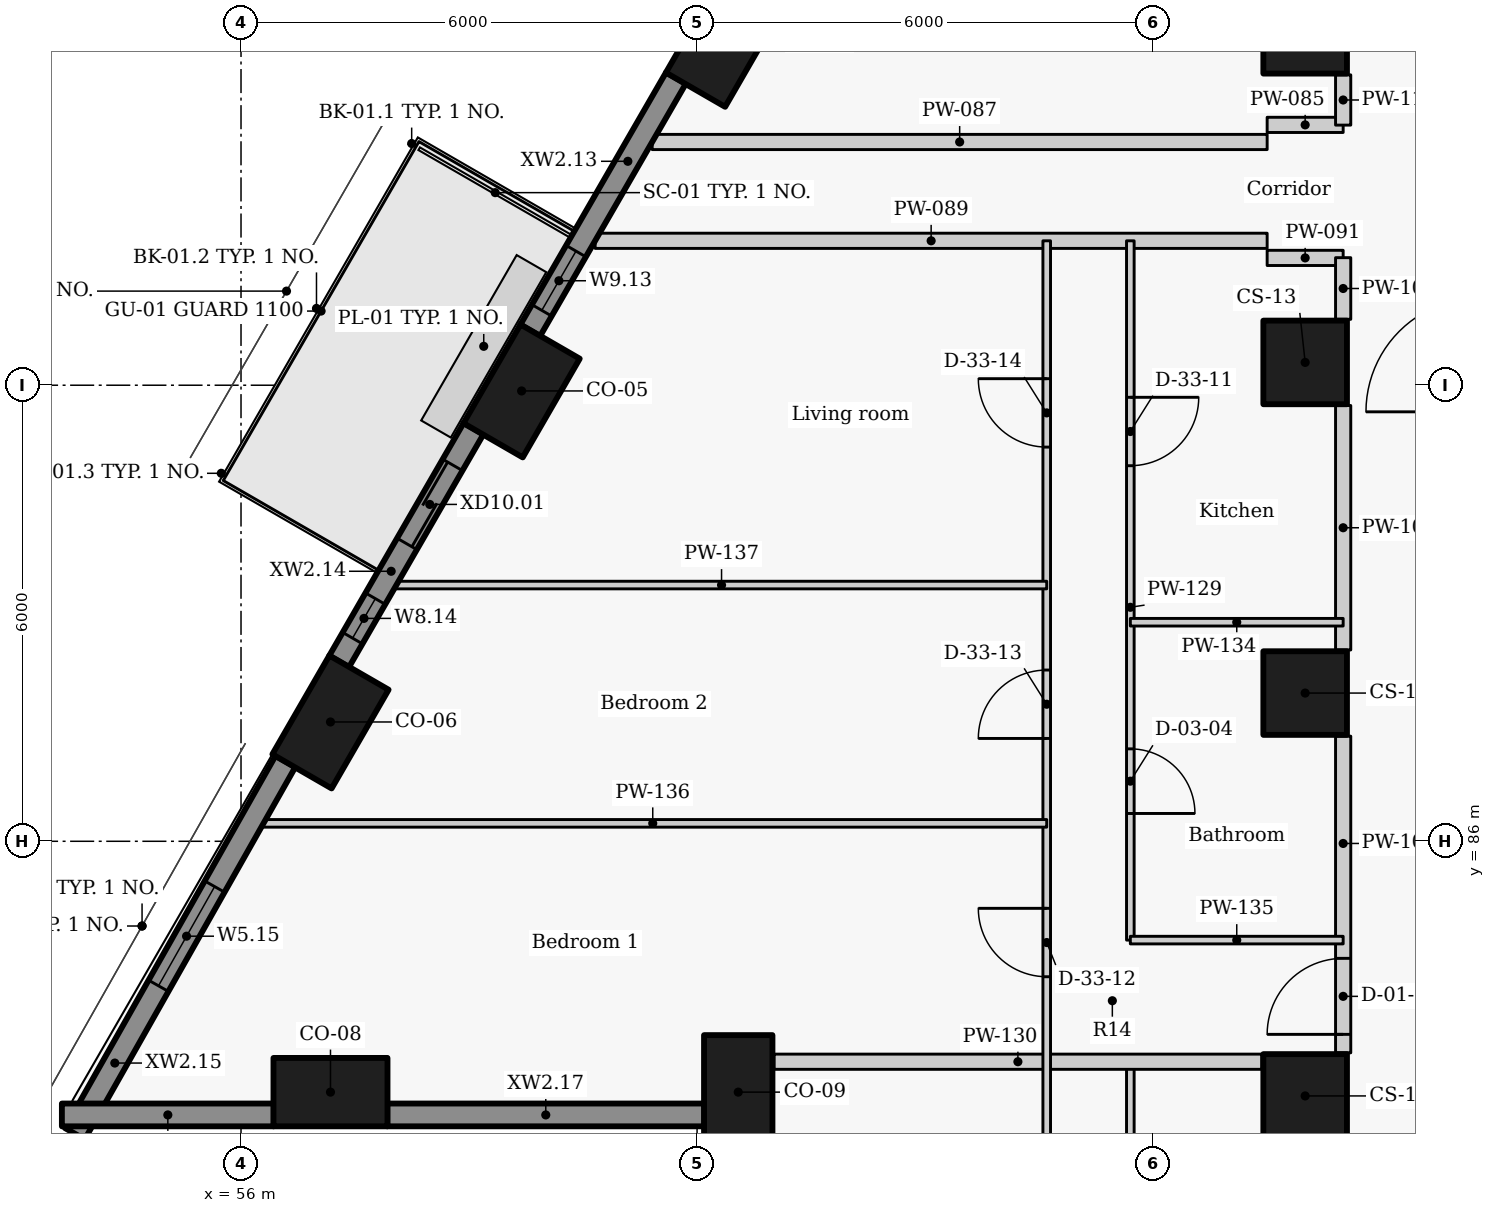
"""IFC4 building model, lengths in metres.
Left out: names, types, materials, properties, quantities, classifications, styles, units other than length and angle.
Written with IfcOpenShell. Run it as: python <this file> out.ifc"""

import sys

from ifc_helpers import new_model, si_unit, direction, frame, frame_2d, origin, origin_2d, place, context, subcontext, project, spatial, rectangle, extrude, element, fill, save


model = new_model("IFC4")
c1 = context("Model", 3, precision=1e-05, world=origin(), true_north=direction((0.0, 1.0)))
c2 = subcontext(c1, "Body", "Model", "MODEL_VIEW")
j1 = project(units=[si_unit("LENGTHUNIT", "METRE"), si_unit("PLANEANGLEUNIT", "RADIAN")], contexts=[c1])
p1 = place(None, origin())
s1 = spatial("IfcSite", under=j1, at=p1, CompositionType="ELEMENT")
p2 = place(p1, origin())
s2 = spatial("IfcBuilding", under=s1, at=p2, CompositionType="ELEMENT")
p3 = place(p2, frame((0.0, 0.0, 41.4)))
s3 = spatial("IfcBuildingStorey", under=s2, at=p3, CompositionType="ELEMENT", Elevation=41.4)
for number, where, z_axis, x_axis in (
    (1, (62.354, 96.537, 0.0), (0.0, 0.0, 1.0), (-0.5, -0.866, 0.0)),
    (2, (59.692, 91.925, 0.0), (0.0, 0.0, 1.0), (-0.5, -0.866, 0.0)),
):
    element("IfcColumn", number, at=place(p3, frame(where, z_axis=z_axis, x_axis=x_axis)), inside=s3, PredefinedType="COLUMN", context=c2, shape_type="SweptSolid", body=[
        extrude(rectangle(XDim=1.5, YDim=0.9, at=origin_2d()), origin(), (0.0, 0.0, 1.0), 3.3),
    ])
for number, where, z_axis, x_axis in (
    (3, (57.177, 87.57, -0.275), (0.0, 0.0, 1.0), (-0.5, -0.866, 0.0)),
    (4, (57.177, 82.7, -0.275), (0.0, 0.0, 1.0), (1.0, 0.0, 0.0)),
    (5, (62.542, 82.7, -0.275), (0.0, 0.0, 1.0), (0.0, -1.0, 0.0)),
):
    element("IfcColumn", number, at=place(p3, frame(where, z_axis=z_axis, x_axis=x_axis)), inside=s3, PredefinedType="COLUMN", context=c2, shape_type="SweptSolid", body=[
        extrude(rectangle(XDim=1.5, YDim=0.9, at=origin_2d()), origin(), (0.0, 0.0, 1.0), 3.575),
    ])
for number, where, z_axis, x_axis in (
    (6, (70.0, 96.65, 0.0), (0.0, 0.0, 1.0), (0.0, -1.0, 0.0)),
    (7, (70.0, 92.3, 0.0), (0.0, 0.0, 1.0), (0.0, -1.0, 0.0)),
    (8, (70.0, 87.95, 0.0), (0.0, 0.0, 1.0), (0.0, -1.0, 0.0)),
):
    element("IfcColumn", number, at=place(p3, frame(where, z_axis=z_axis, x_axis=x_axis)), inside=s3, PredefinedType="COLUMN", context=c2, shape_type="SweptSolid", body=[
        extrude(rectangle(XDim=1.1, YDim=1.1, at=origin_2d()), origin(), (0.0, 0.0, 1.0), 3.3),
    ])
p4 = place(p3, frame((70.0, 82.65, -0.275), z_axis=(0.0, 0.0, 1.0), x_axis=(0.0, -1.0, 0.0)))
e9 = element("IfcColumn", 9, at=p4, inside=s3, PredefinedType="COLUMN", context=c2, shape_type="SweptSolid", body=[
    extrude(rectangle(XDim=1.1, YDim=1.1, at=origin_2d()), origin(), (0.0, 0.0, 1.0), 3.575),
])
p5 = place(p3, frame((61.722, 96.041, 0.0), z_axis=(0.0, 0.0, 1.0), x_axis=(-0.500001735503, -0.866024401789, 0.0)))
e10 = element("IfcWall", 10, at=p5, inside=s3, PredefinedType="SOLIDWALL", context=c2, shape_type="SweptSolid", body=[
    extrude(rectangle(XDim=3.834, YDim=0.3, at=frame_2d((1.917, 0.0))), origin(), (0.0, 0.0, 1.0), 2.425),
])
p6 = place(p5, frame((2.629, 0.0, 0.9)))
e11 = element("IfcOpeningElement", 11, at=p6, cuts=e10, PredefinedType="OPENING", context=c2, shape_type="SweptSolid", body=[
    extrude(rectangle(XDim=0.9, YDim=1.1, at=frame_2d((0.45, 0.55))), frame((0.0, 0.16, 0.0), z_axis=(0.0, -1.0, 0.0), x_axis=(1.0, 0.0, 0.0)), (0.0, 0.0, 1.0), 0.32),
])
p7 = place(p3, frame((59.059, 91.429, 0.0), z_axis=(0.0, 0.0, 1.0), x_axis=(-0.499977402622, -0.866038449993, 0.0)))
e12 = element("IfcWall", 12, at=p7, inside=s3, PredefinedType="SOLIDWALL", context=c2, shape_type="SweptSolid", body=[
    extrude(rectangle(XDim=3.537, YDim=0.3, at=frame_2d((1.769, 0.0))), origin(), (0.0, 0.0, 1.0), 2.425),
])
p8 = place(p7, frame((0.551, 0.0, 0.0)))
e13 = element("IfcOpeningElement", 13, at=p8, cuts=e12, PredefinedType="OPENING", context=c2, shape_type="SweptSolid", body=[
    extrude(rectangle(XDim=1.2, YDim=2.0, at=frame_2d((0.6, 1.0))), frame((0.0, 0.16, 0.0), z_axis=(0.0, -1.0, 0.0), x_axis=(1.0, 0.0, 0.0)), (0.0, 0.0, 1.0), 0.32),
])
p9 = place(p7, frame((2.582, 0.0, 0.9)))
e14 = element("IfcOpeningElement", 14, at=p9, cuts=e12, PredefinedType="OPENING", context=c2, shape_type="SweptSolid", body=[
    extrude(rectangle(XDim=0.6, YDim=1.1, at=frame_2d((0.3, 0.55))), frame((0.0, 0.16, 0.0), z_axis=(0.0, -1.0, 0.0), x_axis=(1.0, 0.0, 0.0)), (0.0, 0.0, 1.0), 0.32),
])
p10 = place(p3, frame((56.584, 87.051, 0.0), z_axis=(0.0, 0.0, 1.0), x_axis=(-0.492363204642, -0.870389840655, 0.0)))
e15 = element("IfcWall", 15, at=p10, inside=s3, PredefinedType="SOLIDWALL", context=c2, shape_type="SweptSolid", body=[
    extrude(rectangle(XDim=5.626, YDim=0.3, at=frame_2d((2.813, 0.0))), origin(), (0.0, 0.0, 1.0), 2.425),
])
p11 = place(p10, frame((1.892, 0.0, 0.9)))
e16 = element("IfcOpeningElement", 16, at=p11, cuts=e15, PredefinedType="OPENING", context=c2, shape_type="SweptSolid", body=[
    extrude(rectangle(XDim=1.5, YDim=1.1, at=frame_2d((0.75, 0.55))), frame((0.0, 0.16, 0.0), z_axis=(0.0, -1.0, 0.0), x_axis=(1.0, 0.0, 0.0)), (0.0, 0.0, 1.0), 0.32),
])
p12 = place(p3, frame((53.643, 82.4, 0.0), z_axis=(0.0, 0.0, 1.0), x_axis=(1.0, 0.0, 0.0)))
e17 = element("IfcWall", 17, at=p12, inside=s3, PredefinedType="SOLIDWALL", context=c2, shape_type="SweptSolid", body=[
    extrude(rectangle(XDim=2.788, YDim=0.3, at=frame_2d((1.394, 0.0))), origin(), (0.0, 0.0, 1.0), 2.425),
])
p13 = place(p3, frame((57.923, 82.4, 0.0), z_axis=(0.0, 0.0, 1.0), x_axis=(1.0, 0.0, 0.0)))
e18 = element("IfcWall", 18, at=p13, inside=s3, PredefinedType="SOLIDWALL", context=c2, shape_type="SweptSolid", body=[
    extrude(rectangle(XDim=4.173, YDim=0.3, at=frame_2d((2.086, 0.0))), origin(), (0.0, 0.0, 1.0), 2.425),
])
p14 = place(p3, frame((69.5, 95.425, 0.0), z_axis=(0.0, 0.0, 1.0), x_axis=(1.0, 0.0, 0.0)))
e19 = element("IfcWall", 19, at=p14, inside=s3, PredefinedType="PARTITIONING", context=c2, shape_type="SweptSolid", body=[
    extrude(rectangle(XDim=1.0, YDim=0.2, at=frame_2d((0.5, 0.0))), origin(), (0.0, 0.0, 1.0), 2.505),
])
p15 = place(p3, frame((61.409, 95.2, 0.0), z_axis=(0.0, 0.0, 1.0), x_axis=(1.0, 0.0, 0.0)))
e20 = element("IfcWall", 20, at=p15, inside=s3, PredefinedType="PARTITIONING", context=c2, shape_type="SweptSolid", body=[
    extrude(rectangle(XDim=8.091, YDim=0.2, at=frame_2d((4.045, 0.0))), origin(), (0.0, 0.0, 1.0), 2.405),
])
p16 = place(p3, frame((60.659, 93.9, 0.0), z_axis=(0.0, 0.0, 1.0), x_axis=(1.0, 0.0, 0.0)))
e21 = element("IfcWall", 21, at=p16, inside=s3, PredefinedType="PARTITIONING", context=c2, shape_type="SweptSolid", body=[
    extrude(rectangle(XDim=8.841, YDim=0.2, at=frame_2d((4.421, 0.0))), origin(), (0.0, 0.0, 1.0), 2.405),
])
p17 = place(p3, frame((69.5, 93.675, 0.0), z_axis=(0.0, 0.0, 1.0), x_axis=(1.0, 0.0, 0.0)))
e22 = element("IfcWall", 22, at=p17, inside=s3, PredefinedType="PARTITIONING", context=c2, shape_type="SweptSolid", body=[
    extrude(rectangle(XDim=1.0, YDim=0.2, at=frame_2d((0.5, 0.0))), origin(), (0.0, 0.0, 1.0), 2.505),
])
p18 = place(p3, frame((70.5, 83.217, 0.0), z_axis=(0.0, 0.0, 1.0), x_axis=(0.0, 1.0, 0.0)))
e23 = element("IfcWall", 23, at=p18, inside=s3, PredefinedType="PARTITIONING", context=c2, shape_type="SweptSolid", body=[
    extrude(rectangle(XDim=4.166, YDim=0.2, at=frame_2d((2.083, 0.0))), origin(), (0.0, 0.0, 1.0), 3.025),
])
p19 = place(p18, frame((0.243, 0.0, 0.0)))
e24 = element("IfcOpeningElement", 24, at=p19, cuts=e23, PredefinedType="OPENING", context=c2, shape_type="SweptSolid", body=[
    extrude(rectangle(XDim=1.0, YDim=2.1, at=frame_2d((0.5, 1.05))), frame((0.0, 0.11, 0.0), z_axis=(0.0, -1.0, 0.0), x_axis=(1.0, 0.0, 0.0)), (0.0, 0.0, 1.0), 0.22),
])
p20 = place(p3, frame((70.5, 88.517, 0.0), z_axis=(0.0, 0.0, 1.0), x_axis=(0.0, 1.0, 0.0)))
e25 = element("IfcWall", 25, at=p20, inside=s3, PredefinedType="PARTITIONING", context=c2, shape_type="SweptSolid", body=[
    extrude(rectangle(XDim=3.216, YDim=0.2, at=frame_2d((1.608, 0.0))), origin(), (0.0, 0.0, 1.0), 3.025),
])
p21 = place(p3, frame((70.5, 92.867, 0.0), z_axis=(0.0, 0.0, 1.0), x_axis=(0.0, 1.0, 0.0)))
e26 = element("IfcWall", 26, at=p21, inside=s3, PredefinedType="PARTITIONING", context=c2, shape_type="SweptSolid", body=[
    extrude(rectangle(XDim=0.811, YDim=0.2, at=frame_2d((0.406, 0.0))), origin(), (0.0, 0.0, 1.0), 3.025),
])
p22 = place(p3, frame((70.5, 95.422, 0.0), z_axis=(0.0, 0.0, 1.0), x_axis=(0.0, 1.0, 0.0)))
e27 = element("IfcWall", 27, at=p22, inside=s3, PredefinedType="PARTITIONING", context=c2, shape_type="SweptSolid", body=[
    extrude(rectangle(XDim=0.661, YDim=0.2, at=frame_2d((0.331, 0.0))), origin(), (0.0, 0.0, 1.0), 3.025),
])
p23 = place(p3, frame((67.7, 83.1, 0.0), z_axis=(0.0, 0.0, 1.0), x_axis=(0.0, -1.0, 0.0)))
e28 = element("IfcWall", 28, at=p23, inside=s3, PredefinedType="PARTITIONING", context=c2, shape_type="SweptSolid", body=[
    extrude(rectangle(XDim=9.0, YDim=0.1, at=frame_2d((4.5, 0.0))), origin(), (0.0, 0.0, 1.0), 3.025),
])
p24 = place(p23, frame((6.53, 0.0, 0.0)))
e29 = element("IfcOpeningElement", 29, at=p24, cuts=e28, PredefinedType="OPENING", context=c2, shape_type="SweptSolid", body=[
    extrude(rectangle(XDim=0.85, YDim=2.1, at=frame_2d((0.425, 1.05))), frame((0.0, 0.06, 0.0), z_axis=(0.0, -1.0, 0.0), x_axis=(1.0, 0.0, 0.0)), (0.0, 0.0, 1.0), 0.12),
])
p25 = place(p23, frame((2.005, 0.0, 0.0)))
e30 = element("IfcOpeningElement", 30, at=p25, cuts=e28, PredefinedType="OPENING", context=c2, shape_type="SweptSolid", body=[
    extrude(rectangle(XDim=0.9, YDim=2.1, at=frame_2d((0.45, 1.05))), frame((0.0, 0.06, 0.0), z_axis=(0.0, -1.0, 0.0), x_axis=(1.0, 0.0, 0.0)), (0.0, 0.0, 1.0), 0.12),
])
p26 = place(p3, frame((67.7, 93.9, 0.0), z_axis=(0.0, 0.0, 1.0), x_axis=(0.0, -1.0, 0.0)))
e31 = element("IfcWall", 31, at=p26, inside=s3, PredefinedType="PARTITIONING", context=c2, shape_type="SweptSolid", body=[
    extrude(rectangle(XDim=9.2, YDim=0.1, at=frame_2d((4.6, 0.0))), origin(), (0.0, 0.0, 1.0), 3.025),
])
p27 = place(p26, frame((6.684, 0.0, 0.0)))
e32 = element("IfcOpeningElement", 32, at=p27, cuts=e31, PredefinedType="OPENING", context=c2, shape_type="SweptSolid", body=[
    extrude(rectangle(XDim=0.85, YDim=2.1, at=frame_2d((0.425, 1.05))), frame((0.0, 0.06, 0.0), z_axis=(0.0, -1.0, 0.0), x_axis=(1.0, 0.0, 0.0)), (0.0, 0.0, 1.0), 0.12),
])
p28 = place(p26, frame((2.059, 0.0, 0.0)))
e33 = element("IfcOpeningElement", 33, at=p28, cuts=e31, PredefinedType="OPENING", context=c2, shape_type="SweptSolid", body=[
    extrude(rectangle(XDim=0.9, YDim=2.1, at=frame_2d((0.45, 1.05))), frame((0.0, 0.06, 0.0), z_axis=(0.0, -1.0, 0.0), x_axis=(1.0, 0.0, 0.0)), (0.0, 0.0, 1.0), 0.12),
])
p29 = place(p3, frame((63.012, 83.1, 0.0), z_axis=(0.0, 0.0, 1.0), x_axis=(1.0, 0.0, 0.0)))
e34 = element("IfcWall", 34, at=p29, inside=s3, PredefinedType="PARTITIONING", context=c2, shape_type="SweptSolid", body=[
    extrude(rectangle(XDim=6.418, YDim=0.2, at=frame_2d((3.209, 0.0))), origin(), (0.0, 0.0, 1.0), 3.025),
])
p30 = place(p3, frame((66.6, 72.0, 0.0), z_axis=(0.0, 0.0, 1.0), x_axis=(0.0, 1.0, 0.0)))
e35 = element("IfcWall", 35, at=p30, inside=s3, PredefinedType="PARTITIONING", context=c2, shape_type="SweptSolid", body=[
    extrude(rectangle(XDim=21.9, YDim=0.1, at=frame_2d((10.95, 0.0))), origin(), (0.0, 0.0, 1.0), 3.025),
])
p31 = place(p30, frame((1.161, 0.0, 0.0)))
e36 = element("IfcOpeningElement", 36, at=p31, cuts=e35, PredefinedType="OPENING", context=c2, shape_type="SweptSolid", body=[
    extrude(rectangle(XDim=0.9, YDim=2.1, at=frame_2d((0.45, 1.05))), frame((0.0, 0.06, 0.0), z_axis=(0.0, -1.0, 0.0), x_axis=(1.0, 0.0, 0.0)), (0.0, 0.0, 1.0), 0.12),
])
p32 = place(p30, frame((4.384, 0.0, 0.0)))
e37 = element("IfcOpeningElement", 37, at=p32, cuts=e35, PredefinedType="OPENING", context=c2, shape_type="SweptSolid", body=[
    extrude(rectangle(XDim=0.9, YDim=2.1, at=frame_2d((0.45, 1.05))), frame((0.0, 0.06, 0.0), z_axis=(0.0, -1.0, 0.0), x_axis=(1.0, 0.0, 0.0)), (0.0, 0.0, 1.0), 0.12),
])
p33 = place(p30, frame((8.323, 0.0, 0.0)))
e38 = element("IfcOpeningElement", 38, at=p33, cuts=e35, PredefinedType="OPENING", context=c2, shape_type="SweptSolid", body=[
    extrude(rectangle(XDim=0.9, YDim=2.1, at=frame_2d((0.45, 1.05))), frame((0.0, 0.06, 0.0), z_axis=(0.0, -1.0, 0.0), x_axis=(1.0, 0.0, 0.0)), (0.0, 0.0, 1.0), 0.12),
])
p34 = place(p30, frame((12.218, 0.0, 0.0)))
e39 = element("IfcOpeningElement", 39, at=p34, cuts=e35, PredefinedType="OPENING", context=c2, shape_type="SweptSolid", body=[
    extrude(rectangle(XDim=0.9, YDim=2.1, at=frame_2d((0.45, 1.05))), frame((0.0, 0.06, 0.0), z_axis=(0.0, -1.0, 0.0), x_axis=(1.0, 0.0, 0.0)), (0.0, 0.0, 1.0), 0.12),
])
p35 = place(p30, frame((15.353, 0.0, 0.0)))
e40 = element("IfcOpeningElement", 40, at=p35, cuts=e35, PredefinedType="OPENING", context=c2, shape_type="SweptSolid", body=[
    extrude(rectangle(XDim=0.9, YDim=2.1, at=frame_2d((0.45, 1.05))), frame((0.0, 0.06, 0.0), z_axis=(0.0, -1.0, 0.0), x_axis=(1.0, 0.0, 0.0)), (0.0, 0.0, 1.0), 0.12),
])
p36 = place(p30, frame((19.186, 0.0, 0.0)))
e41 = element("IfcOpeningElement", 41, at=p36, cuts=e35, PredefinedType="OPENING", context=c2, shape_type="SweptSolid", body=[
    extrude(rectangle(XDim=0.9, YDim=2.1, at=frame_2d((0.45, 1.05))), frame((0.0, 0.06, 0.0), z_axis=(0.0, -1.0, 0.0), x_axis=(1.0, 0.0, 0.0)), (0.0, 0.0, 1.0), 0.12),
])
for number, where, z_axis, x_axis in (
    (42, (67.7, 88.882, 0.0), (0.0, 0.0, 1.0), (1.0, 0.0, 0.0)),
    (43, (67.7, 84.7, 0.0), (0.0, 0.0, 1.0), (1.0, 0.0, 0.0)),
):
    element("IfcWall", number, at=place(p3, frame(where, z_axis=z_axis, x_axis=x_axis)), inside=s3, PredefinedType="PARTITIONING", context=c2, shape_type="SweptSolid", body=[
        extrude(rectangle(XDim=2.8, YDim=0.1, at=frame_2d((1.4, 0.0))), origin(), (0.0, 0.0, 1.0), 2.505),
    ])
p37 = place(p3, frame((56.234, 86.236, 0.0), z_axis=(0.0, 0.0, 1.0), x_axis=(1.0, 0.0, 0.0)))
e44 = element("IfcWall", 44, at=p37, inside=s3, PredefinedType="PARTITIONING", context=c2, shape_type="SweptSolid", body=[
    extrude(rectangle(XDim=10.366, YDim=0.1, at=frame_2d((5.183, 0.0))), origin(), (0.0, 0.0, 1.0), 2.405),
])
p38 = place(p3, frame((58.044, 89.371, 0.0), z_axis=(0.0, 0.0, 1.0), x_axis=(1.0, 0.0, 0.0)))
e45 = element("IfcWall", 45, at=p38, inside=s3, PredefinedType="PARTITIONING", context=c2, shape_type="SweptSolid", body=[
    extrude(rectangle(XDim=8.556, YDim=0.1, at=frame_2d((4.278, 0.0))), origin(), (0.0, 0.0, 1.0), 2.405),
])
p39 = place(p6, origin())
e46 = element("IfcWindow", 46, at=p39, inside=s3, PartitioningType="SINGLE_PANEL", PredefinedType="WINDOW", context=c2, shape_type="SweptSolid", body=[
    extrude(rectangle(XDim=0.9, YDim=1.1, at=frame_2d((0.45, 0.55))), frame((0.0, 0.03, 0.0), z_axis=(0.0, -1.0, 0.0), x_axis=(1.0, 0.0, 0.0)), (0.0, 0.0, 1.0), 0.06),
])
fill(e11, e46)
p40 = place(p8, origin())
e47 = element("IfcDoor", 47, at=p40, inside=s3, OperationType="SLIDING_TO_LEFT", PredefinedType="DOOR", context=c2, shape_type="SweptSolid", body=[
    extrude(rectangle(XDim=1.2, YDim=2.0, at=frame_2d((0.6, 1.0))), frame((0.0, 0.025, 0.0), z_axis=(0.0, -1.0, 0.0), x_axis=(1.0, 0.0, 0.0)), (0.0, 0.0, 1.0), 0.05),
])
fill(e13, e47)
p41 = place(p9, origin())
e48 = element("IfcWindow", 48, at=p41, inside=s3, PartitioningType="SINGLE_PANEL", PredefinedType="WINDOW", context=c2, shape_type="SweptSolid", body=[
    extrude(rectangle(XDim=0.6, YDim=1.1, at=frame_2d((0.3, 0.55))), frame((0.0, 0.03, 0.0), z_axis=(0.0, -1.0, 0.0), x_axis=(1.0, 0.0, 0.0)), (0.0, 0.0, 1.0), 0.06),
])
fill(e14, e48)
p42 = place(p11, origin())
e49 = element("IfcWindow", 49, at=p42, inside=s3, PartitioningType="SINGLE_PANEL", PredefinedType="WINDOW", context=c2, shape_type="SweptSolid", body=[
    extrude(rectangle(XDim=1.5, YDim=1.1, at=frame_2d((0.75, 0.55))), frame((0.0, 0.03, 0.0), z_axis=(0.0, -1.0, 0.0), x_axis=(1.0, 0.0, 0.0)), (0.0, 0.0, 1.0), 0.06),
])
fill(e16, e49)
p43 = place(p19, origin())
e50 = element("IfcDoor", 50, at=p43, inside=s3, OperationType="SINGLE_SWING_LEFT", PredefinedType="DOOR", context=c2, shape_type="SweptSolid", body=[
    extrude(rectangle(XDim=1.0, YDim=2.1, at=frame_2d((0.5, 1.05))), frame((0.0, 0.025, 0.0), z_axis=(0.0, -1.0, 0.0), x_axis=(1.0, 0.0, 0.0)), (0.0, 0.0, 1.0), 0.05),
])
fill(e24, e50)
p44 = place(p27, origin())
e51 = element("IfcDoor", 51, at=p44, inside=s3, OperationType="SINGLE_SWING_RIGHT", PredefinedType="DOOR", context=c2, shape_type="SweptSolid", body=[
    extrude(rectangle(XDim=0.85, YDim=2.1, at=frame_2d((0.425, 1.05))), frame((0.0, 0.025, 0.0), z_axis=(0.0, -1.0, 0.0), x_axis=(1.0, 0.0, 0.0)), (0.0, 0.0, 1.0), 0.05),
])
fill(e32, e51)
p45 = place(p28, origin())
e52 = element("IfcDoor", 52, at=p45, inside=s3, OperationType="SINGLE_SWING_LEFT", PredefinedType="DOOR", context=c2, shape_type="SweptSolid", body=[
    extrude(rectangle(XDim=0.9, YDim=2.1, at=frame_2d((0.45, 1.05))), frame((0.0, 0.025, 0.0), z_axis=(0.0, -1.0, 0.0), x_axis=(1.0, 0.0, 0.0)), (0.0, 0.0, 1.0), 0.05),
])
fill(e33, e52)
p46 = place(p34, origin())
e53 = element("IfcDoor", 53, at=p46, inside=s3, OperationType="SINGLE_SWING_RIGHT", PredefinedType="DOOR", context=c2, shape_type="SweptSolid", body=[
    extrude(rectangle(XDim=0.9, YDim=2.1, at=frame_2d((0.45, 1.05))), frame((0.0, 0.025, 0.0), z_axis=(0.0, -1.0, 0.0), x_axis=(1.0, 0.0, 0.0)), (0.0, 0.0, 1.0), 0.05),
])
fill(e39, e53)
p47 = place(p35, origin())
e54 = element("IfcDoor", 54, at=p47, inside=s3, OperationType="SINGLE_SWING_LEFT", PredefinedType="DOOR", context=c2, shape_type="SweptSolid", body=[
    extrude(rectangle(XDim=0.9, YDim=2.1, at=frame_2d((0.45, 1.05))), frame((0.0, 0.025, 0.0), z_axis=(0.0, -1.0, 0.0), x_axis=(1.0, 0.0, 0.0)), (0.0, 0.0, 1.0), 0.05),
])
fill(e40, e54)
p48 = place(p36, origin())
e55 = element("IfcDoor", 55, at=p48, inside=s3, OperationType="SINGLE_SWING_RIGHT", PredefinedType="DOOR", context=c2, shape_type="SweptSolid", body=[
    extrude(rectangle(XDim=0.9, YDim=2.1, at=frame_2d((0.45, 1.05))), frame((0.0, 0.025, 0.0), z_axis=(0.0, -1.0, 0.0), x_axis=(1.0, 0.0, 0.0)), (0.0, 0.0, 1.0), 0.05),
])
fill(e41, e55)
save(model, sys.argv[1])
